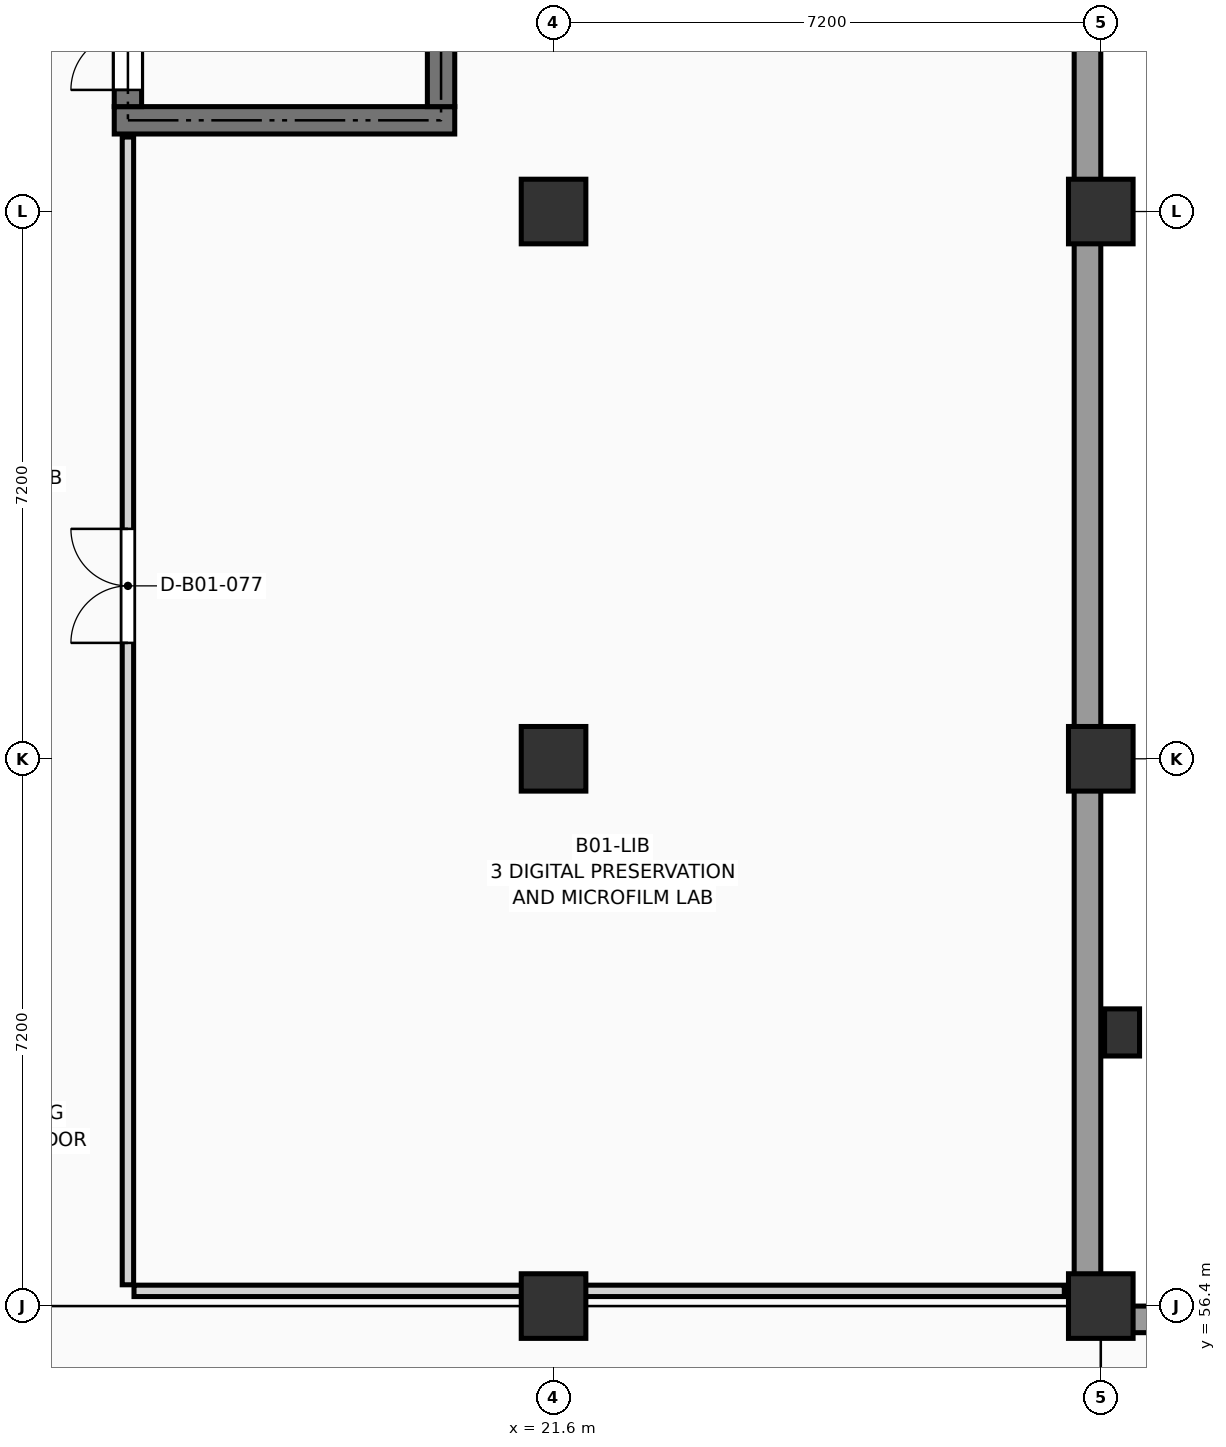
"""IFC4 building model, lengths in metres.
Left out: names, types, materials, properties, quantities, classifications, styles, units other than length and angle.
Written with IfcOpenShell. Run it as: python <this file> out.ifc"""

import sys

from ifc_helpers import new_model, si_unit, direction, frame, frame_2d, origin, origin_2d, place, context, subcontext, project, spatial, rectangle, extrude, element, fill, save


model = new_model("IFC4")
c1 = context("Model", 3, precision=1e-05, world=origin(), true_north=direction((0.0, 1.0)))
c2 = subcontext(c1, "Body", "Model", "MODEL_VIEW")
j1 = project(units=[si_unit("LENGTHUNIT", "METRE"), si_unit("PLANEANGLEUNIT", "RADIAN")], contexts=[c1])
p1 = place(None, origin())
s1 = spatial("IfcSite", under=j1, at=p1, CompositionType="ELEMENT")
p2 = place(p1, origin())
s2 = spatial("IfcBuilding", under=s1, at=p2, CompositionType="ELEMENT")
p3 = place(p2, frame((0.0, 0.0, -4.5)))
s3 = spatial("IfcBuildingStorey", under=s2, at=p3, CompositionType="ELEMENT", Elevation=-4.5)
p4 = place(p3, frame((21.6, 56.4, 0.0), z_axis=(0.0, 0.0, 1.0), x_axis=(1.0, 0.0, 0.0)))
e1 = element("IfcColumn", 1, at=p4, inside=s3, PredefinedType="COLUMN", context=c2, shape_type="SweptSolid", body=[
    extrude(rectangle(XDim=0.85, YDim=0.85, at=origin_2d()), origin(), (0.0, 0.0, 1.0), 4.5),
])
p5 = place(p3, frame((21.6, 63.6, -0.28), z_axis=(0.0, 0.0, 1.0), x_axis=(1.0, 0.0, 0.0)))
e2 = element("IfcColumn", 2, at=p5, inside=s3, PredefinedType="COLUMN", context=c2, shape_type="SweptSolid", body=[
    extrude(rectangle(XDim=0.85, YDim=0.85, at=origin_2d()), origin(), (0.0, 0.0, 1.0), 4.78),
])
p6 = place(p3, frame((21.6, 70.8, 0.0), z_axis=(0.0, 0.0, 1.0), x_axis=(1.0, 0.0, 0.0)))
e3 = element("IfcColumn", 3, at=p6, inside=s3, PredefinedType="COLUMN", context=c2, shape_type="SweptSolid", body=[
    extrude(rectangle(XDim=0.85, YDim=0.85, at=origin_2d()), origin(), (0.0, 0.0, 1.0), 4.5),
])
p7 = place(p3, frame((28.8, 56.4, -0.3), z_axis=(0.0, 0.0, 1.0), x_axis=(1.0, 0.0, 0.0)))
e4 = element("IfcColumn", 4, at=p7, inside=s3, PredefinedType="COLUMN", context=c2, shape_type="SweptSolid", body=[
    extrude(rectangle(XDim=0.85, YDim=0.85, at=origin_2d()), origin(), (0.0, 0.0, 1.0), 4.8),
])
for number, where, z_axis, x_axis in (
    (5, (28.8, 63.6, -0.28), (0.0, 0.0, 1.0), (1.0, 0.0, 0.0)),
    (6, (28.8, 70.8, -0.28), (0.0, 0.0, 1.0), (1.0, 0.0, 0.0)),
):
    element("IfcColumn", number, at=place(p3, frame(where, z_axis=z_axis, x_axis=x_axis)), inside=s3, PredefinedType="COLUMN", context=c2, shape_type="SweptSolid", body=[
        extrude(rectangle(XDim=0.85, YDim=0.85, at=origin_2d()), origin(), (0.0, 0.0, 1.0), 4.78),
    ])
p8 = place(p3, frame((29.08, 60.0, -0.28), z_axis=(0.0, 0.0, 1.0), x_axis=(1.0, 0.0, 0.0)))
e7 = element("IfcColumn", 7, at=p8, inside=s3, PredefinedType="PILASTER", context=c2, shape_type="SweptSolid", body=[
    extrude(rectangle(XDim=0.46, YDim=0.62, at=origin_2d()), origin(), (0.0, 0.0, 1.0), 4.78),
])
p9 = place(p3, frame((28.625, 85.2, -0.3), z_axis=(0.0, 0.0, 1.0), x_axis=(0.0, -1.0, 0.0)))
e8 = element("IfcWall", 8, at=p9, inside=s3, PredefinedType="USERDEFINED", context=c2, shape_type="SweptSolid", body=[
    extrude(rectangle(XDim=28.8, YDim=0.35, at=frame_2d((14.4, 0.0))), origin(), (0.0, 0.0, 1.0), 4.54),
])
p10 = place(p3, frame((28.8, 56.225, -0.3), z_axis=(0.0, 0.0, 1.0), x_axis=(1.0, 0.0, 0.0)))
e9 = element("IfcWall", 9, at=p10, inside=s3, PredefinedType="USERDEFINED", context=c2, shape_type="SweptSolid", body=[
    extrude(rectangle(XDim=36.0, YDim=0.35, at=frame_2d((18.0, 0.0))), origin(), (0.0, 0.0, 1.0), 4.54),
])
p11 = place(p3, frame((15.82, 72.0, -0.3), z_axis=(0.0, 0.0, 1.0), x_axis=(1.0, 0.0, 0.0)))
e10 = element("IfcWall", 10, at=p11, inside=s3, PredefinedType="SHEAR", context=c2, shape_type="SweptSolid", body=[
    extrude(rectangle(XDim=4.48, YDim=0.36, at=frame_2d((2.24, 0.0))), origin(), (0.0, 0.0, 1.0), 4.54),
])
p12 = place(p3, frame((16.0, 72.18, -0.3), z_axis=(0.0, 0.0, 1.0), x_axis=(0.0, 1.0, 0.0)))
e11 = element("IfcWall", 11, at=p12, inside=s3, PredefinedType="SHEAR", context=c2, shape_type="SweptSolid", body=[
    extrude(rectangle(XDim=7.24, YDim=0.36, at=frame_2d((3.62, 0.0))), origin(), (0.0, 0.0, 1.0), 4.54),
])
p13 = place(p12, frame((0.22, 0.0, 0.3)))
e12 = element("IfcOpeningElement", 12, at=p13, cuts=e11, PredefinedType="OPENING", context=c2, shape_type="SweptSolid", body=[
    extrude(rectangle(XDim=1.5, YDim=2.2, at=frame_2d((0.75, 1.1))), frame((0.0, 0.192, 0.0), z_axis=(0.0, -1.0, 0.0), x_axis=(1.0, 0.0, 0.0)), (0.0, 0.0, 1.0), 0.384),
])
p14 = place(p3, frame((20.12, 72.18, -0.3), z_axis=(0.0, 0.0, 1.0), x_axis=(0.0, 1.0, 0.0)))
e13 = element("IfcWall", 13, at=p14, inside=s3, PredefinedType="SHEAR", context=c2, shape_type="SweptSolid", body=[
    extrude(rectangle(XDim=7.24, YDim=0.36, at=frame_2d((3.62, 0.0))), origin(), (0.0, 0.0, 1.0), 4.54),
])
p15 = place(p3, frame((16.0, 56.68, 0.0), z_axis=(0.0, 0.0, 1.0), x_axis=(0.0, 1.0, 0.0)))
e14 = element("IfcWall", 14, at=p15, inside=s3, PredefinedType="PARTITIONING", context=c2, shape_type="SweptSolid", body=[
    extrude(rectangle(XDim=15.1, YDim=0.15, at=frame_2d((7.55, 0.0))), origin(), (0.0, 0.0, 1.0), 4.225),
])
p16 = place(p15, frame((8.445, 0.0, 0.0)))
e15 = element("IfcOpeningElement", 15, at=p16, cuts=e14, PredefinedType="OPENING", context=c2, shape_type="SweptSolid", body=[
    extrude(rectangle(XDim=1.5, YDim=2.2, at=frame_2d((0.75, 1.1))), frame((0.0, 0.087, 0.0), z_axis=(0.0, -1.0, 0.0), x_axis=(1.0, 0.0, 0.0)), (0.0, 0.0, 1.0), 0.174),
])
p17 = place(p3, frame((16.08, 56.6, 0.0), z_axis=(0.0, 0.0, 1.0), x_axis=(1.0, 0.0, 0.0)))
e16 = element("IfcWall", 16, at=p17, inside=s3, PredefinedType="PARTITIONING", context=c2, shape_type="SweptSolid", body=[
    extrude(rectangle(XDim=12.24, YDim=0.15, at=frame_2d((6.12, 0.0))), origin(), (0.0, 0.0, 1.0), 3.375),
])
p18 = place(p13, origin())
e17 = element("IfcDoor", 17, at=p18, inside=s3, OperationType="DOUBLE_DOOR_SINGLE_SWING", PredefinedType="DOOR", context=c2, shape_type="SweptSolid", body=[
    extrude(rectangle(XDim=1.5, YDim=2.2, at=frame_2d((0.75, 1.1))), frame((0.0, 0.025, 0.0), z_axis=(0.0, -1.0, 0.0), x_axis=(1.0, 0.0, 0.0)), (0.0, 0.0, 1.0), 0.05),
])
fill(e12, e17)
p19 = place(p16, origin())
e18 = element("IfcDoor", 18, at=p19, inside=s3, OperationType="DOUBLE_DOOR_SINGLE_SWING", PredefinedType="DOOR", context=c2, shape_type="SweptSolid", body=[
    extrude(rectangle(XDim=1.5, YDim=2.2, at=frame_2d((0.75, 1.1))), frame((0.0, 0.025, 0.0), z_axis=(0.0, -1.0, 0.0), x_axis=(1.0, 0.0, 0.0)), (0.0, 0.0, 1.0), 0.05),
])
fill(e15, e18)
save(model, sys.argv[1])
